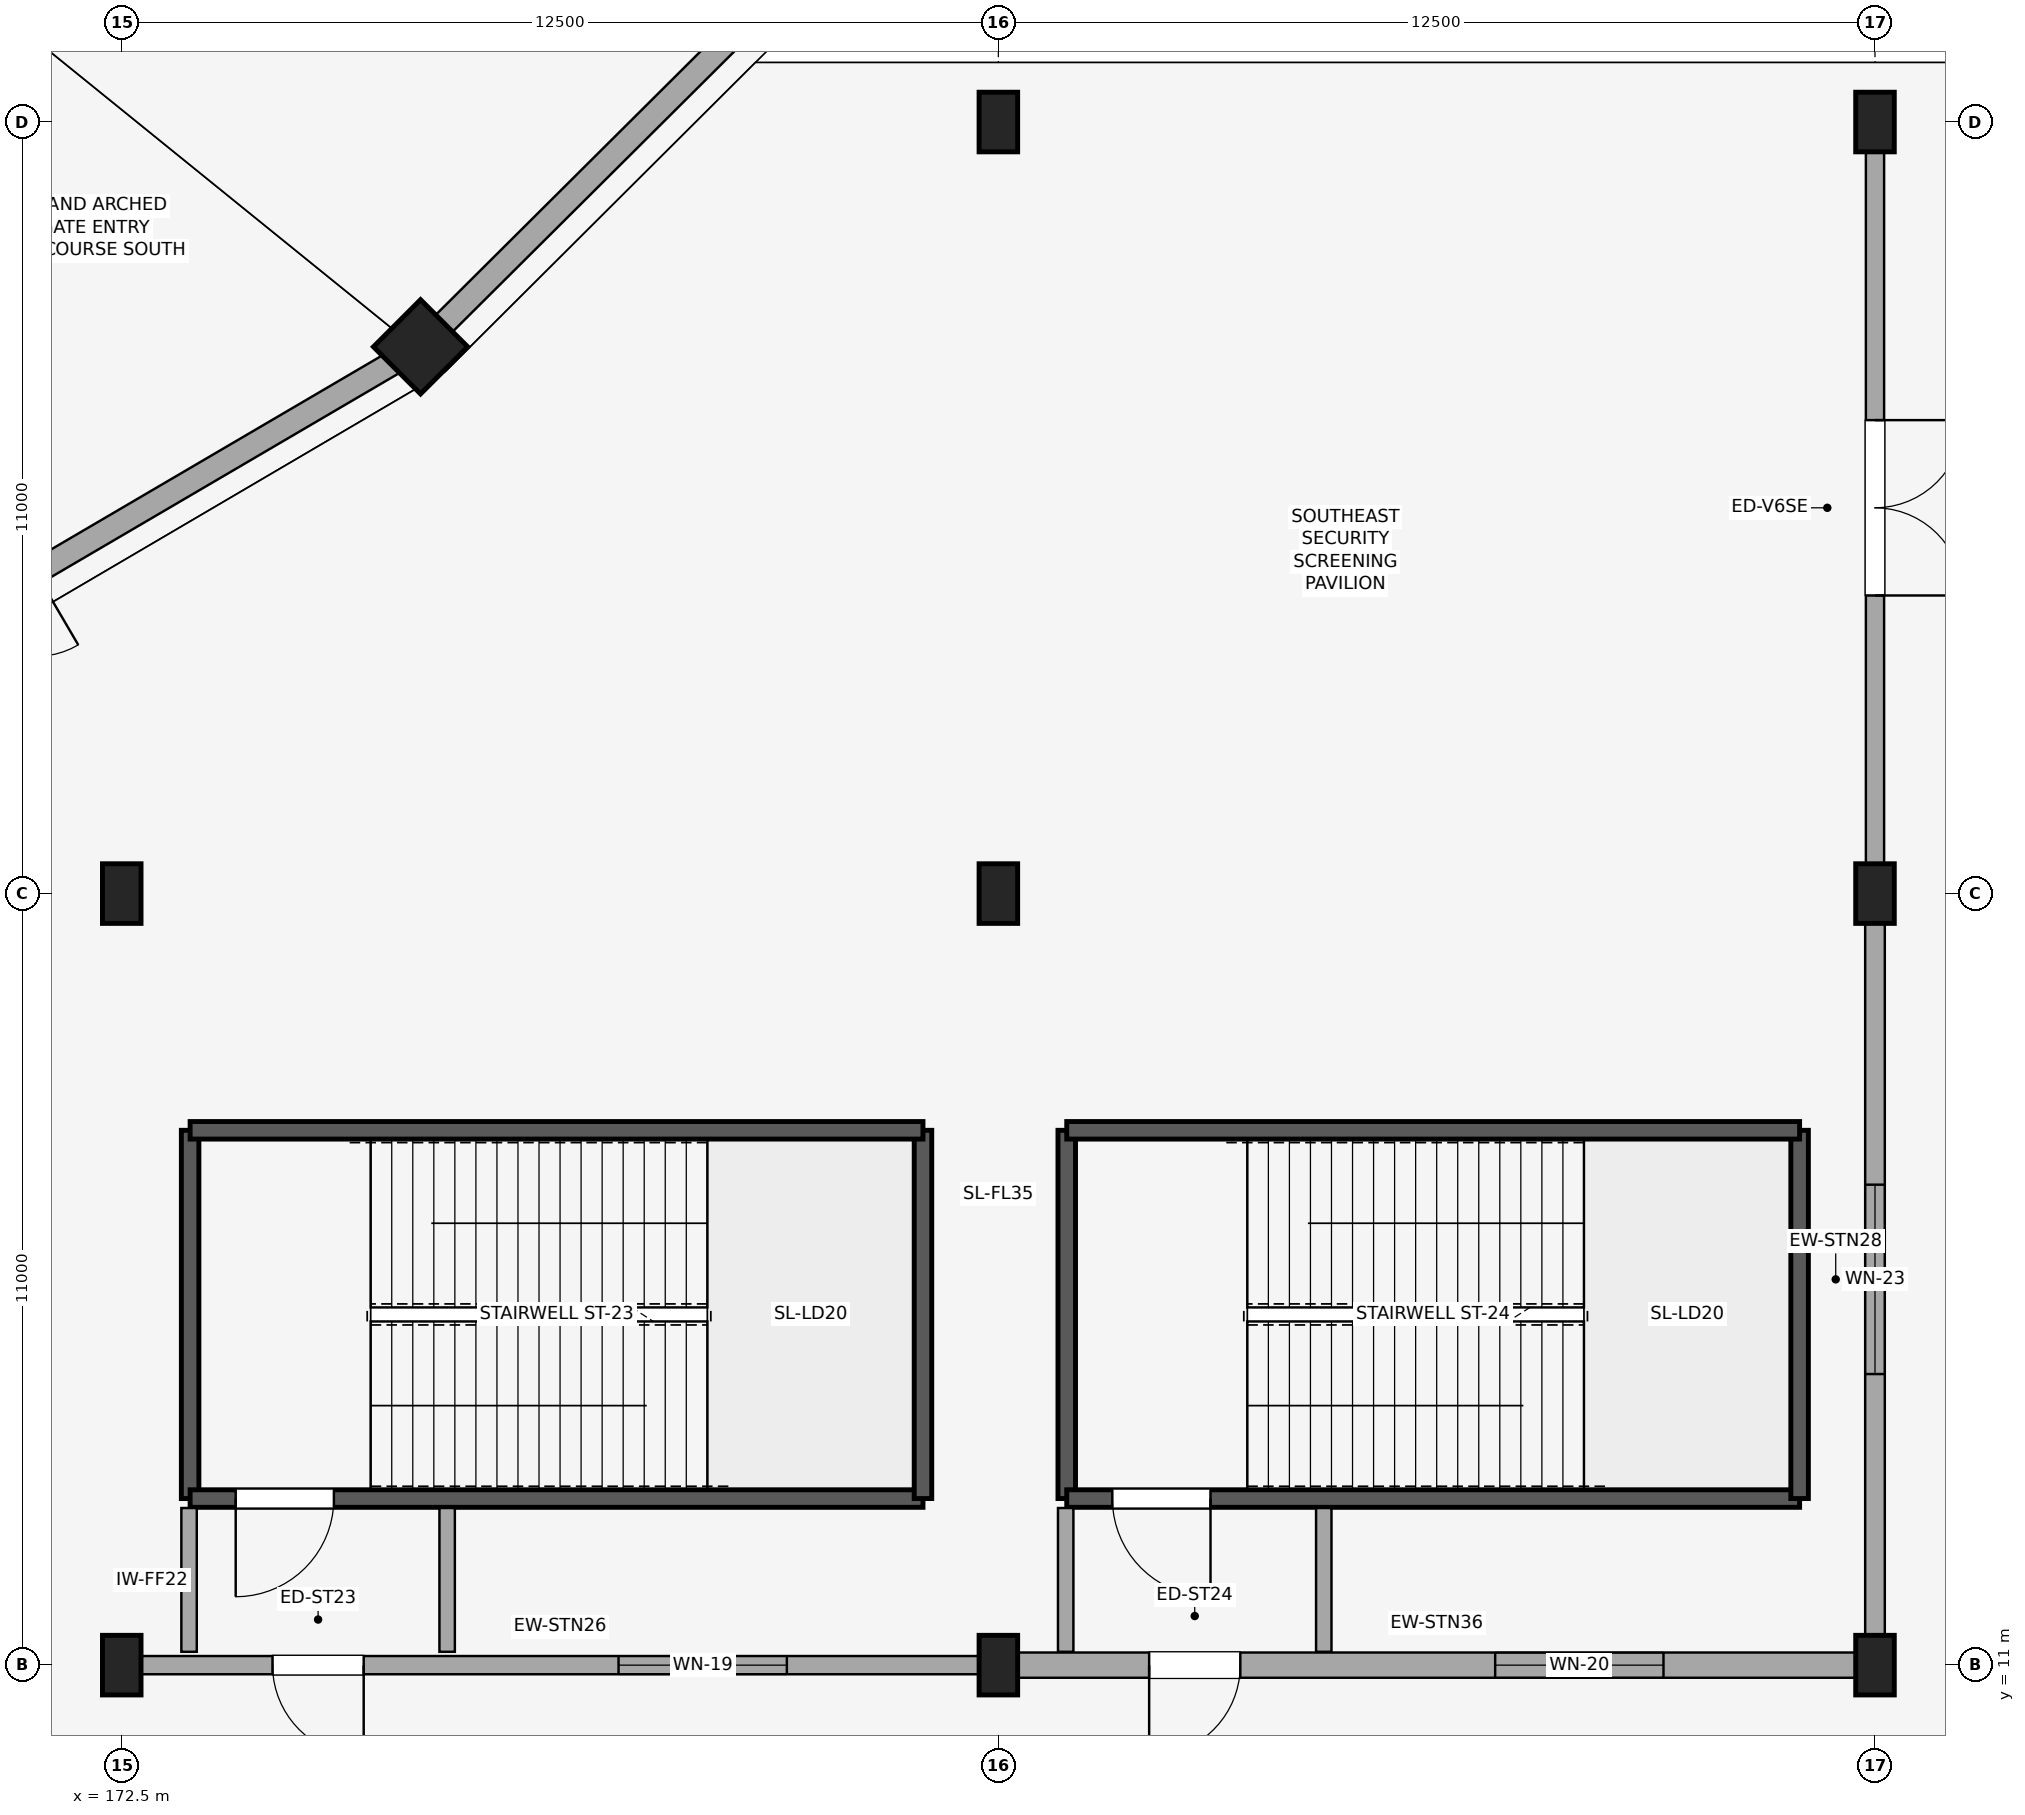
"""IFC4 building model, lengths in metres.
Left out: names, types, materials, properties, quantities, classifications, styles, units other than length and angle.
Written with IfcOpenShell. Run it as: python <this file> out.ifc"""

import sys

from ifc_helpers import new_model, si_unit, direction, frame, frame_2d, origin, origin_2d, place, context, subcontext, project, spatial, rectangle, circle, extrude, element, fill, save


model = new_model("IFC4")
c1 = context("Model", 3, precision=1e-05, world=origin(), true_north=direction((0.0, 1.0)))
c2 = subcontext(c1, "Body", "Model", "MODEL_VIEW")
j1 = project(units=[si_unit("LENGTHUNIT", "METRE"), si_unit("PLANEANGLEUNIT", "RADIAN")], contexts=[c1])
p1 = place(None, origin())
s1 = spatial("IfcSite", under=j1, at=p1, CompositionType="ELEMENT")
p2 = place(p1, origin())
s2 = spatial("IfcBuilding", under=s1, at=p2, CompositionType="ELEMENT")
p3 = place(p2, origin())
s3 = spatial("IfcBuildingStorey", under=s2, at=p3, CompositionType="ELEMENT", Elevation=0.0)
p4 = place(p3, frame((176.761, 29.795, 0.0), z_axis=(0.0, 0.0, 1.0), x_axis=(0.707106781187, -0.707106781187, 0.0)))
e1 = element("IfcColumn", 1, at=p4, inside=s3, PredefinedType="COLUMN", context=c2, shape_type="SweptSolid", body=[
    extrude(circle(Radius=0.475, at=origin_2d()), origin(), (0.0, 0.0, 1.0), 5.4),
])
for number, where, z_axis, x_axis in (
    (2, (172.5, 11.0, 0.0), (0.0, 0.0, 1.0), (1.0, 0.0, 0.0)),
    (3, (172.5, 22.0, 0.0), (0.0, 0.0, 1.0), (1.0, 0.0, 0.0)),
    (4, (185.0, 11.0, 0.0), (0.0, 0.0, 1.0), (1.0, 0.0, 0.0)),
    (5, (185.0, 22.0, 0.0), (0.0, 0.0, 1.0), (1.0, 0.0, 0.0)),
    (6, (185.0, 33.0, 0.0), (0.0, 0.0, 1.0), (1.0, 0.0, 0.0)),
    (7, (197.5, 11.0, 0.0), (0.0, 0.0, 1.0), (1.0, 0.0, 0.0)),
    (8, (197.5, 22.0, 0.0), (0.0, 0.0, 1.0), (1.0, 0.0, 0.0)),
    (9, (197.5, 33.0, 0.0), (0.0, 0.0, 1.0), (1.0, 0.0, 0.0)),
):
    element("IfcColumn", number, at=place(p3, frame(where, z_axis=z_axis, x_axis=x_axis)), inside=s3, PredefinedType="PILASTER", context=c2, shape_type="SweptSolid", body=[
        extrude(rectangle(XDim=0.55, YDim=0.85, at=origin_2d()), origin(), (0.0, 0.0, 1.0), 5.4),
    ])
p5 = place(p3, frame((157.897, 18.745, 0.0), z_axis=(0.0, 0.0, 1.0), x_axis=(0.862843632099, 0.505470935413, 0.0)))
e10 = element("IfcWall", 10, at=p5, inside=s3, PredefinedType="STANDARD", context=c2, shape_type="SweptSolid", body=[
    extrude(rectangle(XDim=21.403, YDim=0.34, at=frame_2d((10.701, 0.0))), origin(), (0.0, 0.0, 1.0), 3.85),
])
p6 = place(p5, frame((5.613, 0.0, 0.0)))
e11 = element("IfcOpeningElement", 11, at=p6, cuts=e10, PredefinedType="OPENING", context=c2, shape_type="SweptSolid", body=[
    extrude(rectangle(XDim=1.3, YDim=2.2, at=frame_2d((0.65, 1.1))), frame((0.0, 0.18, 0.0), z_axis=(0.0, -1.0, 0.0), x_axis=(1.0, 0.0, 0.0)), (0.0, 0.0, 1.0), 0.36),
])
p7 = place(p5, frame((13.103, 0.0, 0.0)))
e12 = element("IfcOpeningElement", 12, at=p7, cuts=e10, PredefinedType="OPENING", context=c2, shape_type="SweptSolid", body=[
    extrude(rectangle(XDim=2.4, YDim=2.4, at=frame_2d((1.2, 1.2))), frame((0.0, 0.18, 0.0), z_axis=(0.0, -1.0, 0.0), x_axis=(1.0, 0.0, 0.0)), (0.0, 0.0, 1.0), 0.36),
])
p8 = place(p3, frame((177.087, 30.12, 0.0), z_axis=(0.0, 0.0, 1.0), x_axis=(0.708905356977, 0.705303618911, 0.0)))
e13 = element("IfcWall", 13, at=p8, inside=s3, PredefinedType="STANDARD", context=c2, shape_type="SweptSolid", body=[
    extrude(rectangle(XDim=19.928, YDim=0.34, at=frame_2d((9.964, 0.0))), origin(), (0.0, 0.0, 1.0), 3.85),
])
p9 = place(p8, frame((8.739, 0.0, 0.0)))
e14 = element("IfcOpeningElement", 14, at=p9, cuts=e13, PredefinedType="OPENING", context=c2, shape_type="SweptSolid", body=[
    extrude(rectangle(XDim=2.45, YDim=2.4, at=frame_2d((1.225, 1.2))), frame((0.0, 0.18, 0.0), z_axis=(0.0, -1.0, 0.0), x_axis=(1.0, 0.0, 0.0)), (0.0, 0.0, 1.0), 0.36),
])
p10 = place(p3, frame((172.772, 11.0, 0.0), z_axis=(0.0, 0.0, 1.0), x_axis=(1.0, 0.0, 0.0)))
e15 = element("IfcWall", 15, at=p10, inside=s3, PredefinedType="STANDARD", context=c2, shape_type="SweptSolid", body=[
    extrude(rectangle(XDim=11.956, YDim=0.26, at=frame_2d((5.978, 0.0))), origin(), (0.0, 0.0, 1.0), 4.48),
])
p11 = place(p10, frame((1.878, 0.0, 0.0)))
e16 = element("IfcOpeningElement", 16, at=p11, cuts=e15, PredefinedType="OPENING", context=c2, shape_type="SweptSolid", body=[
    extrude(rectangle(XDim=1.3, YDim=2.2, at=frame_2d((0.65, 1.1))), frame((0.0, 0.14, 0.0), z_axis=(0.0, -1.0, 0.0), x_axis=(1.0, 0.0, 0.0)), (0.0, 0.0, 1.0), 0.28),
])
p12 = place(p10, frame((6.812, 0.0, 0.95)))
e17 = element("IfcOpeningElement", 17, at=p12, cuts=e15, PredefinedType="OPENING", context=c2, shape_type="SweptSolid", body=[
    extrude(rectangle(XDim=2.4, YDim=1.85, at=frame_2d((1.2, 0.925))), frame((0.0, 0.14, 0.0), z_axis=(0.0, -1.0, 0.0), x_axis=(1.0, 0.0, 0.0)), (0.0, 0.0, 1.0), 0.28),
])
p13 = place(p3, frame((185.272, 11.0, 0.0), z_axis=(0.0, 0.0, 1.0), x_axis=(1.0, 0.0, 0.0)))
e18 = element("IfcWall", 18, at=p13, inside=s3, PredefinedType="STANDARD", context=c2, shape_type="SweptSolid", body=[
    extrude(rectangle(XDim=11.956, YDim=0.36, at=frame_2d((5.978, 0.0))), origin(), (0.0, 0.0, 1.0), 4.48),
])
p14 = place(p13, frame((1.878, 0.0, 0.0)))
e19 = element("IfcOpeningElement", 19, at=p14, cuts=e18, PredefinedType="OPENING", context=c2, shape_type="SweptSolid", body=[
    extrude(rectangle(XDim=1.3, YDim=2.2, at=frame_2d((0.65, 1.1))), frame((0.0, 0.19, 0.0), z_axis=(0.0, -1.0, 0.0), x_axis=(1.0, 0.0, 0.0)), (0.0, 0.0, 1.0), 0.38),
])
p15 = place(p13, frame((6.812, 0.0, 0.95)))
e20 = element("IfcOpeningElement", 20, at=p15, cuts=e18, PredefinedType="OPENING", context=c2, shape_type="SweptSolid", body=[
    extrude(rectangle(XDim=2.4, YDim=2.1, at=frame_2d((1.2, 1.05))), frame((0.0, 0.19, 0.0), z_axis=(0.0, -1.0, 0.0), x_axis=(1.0, 0.0, 0.0)), (0.0, 0.0, 1.0), 0.38),
])
p16 = place(p3, frame((197.5, 11.422, 0.0), z_axis=(0.0, 0.0, 1.0), x_axis=(0.0, 1.0, 0.0)))
e21 = element("IfcWall", 21, at=p16, inside=s3, PredefinedType="STANDARD", context=c2, shape_type="SweptSolid", body=[
    extrude(rectangle(XDim=10.156, YDim=0.28, at=frame_2d((5.078, 0.0))), origin(), (0.0, 0.0, 1.0), 4.48),
])
p17 = place(p16, frame((3.728, 0.0, 0.95)))
e22 = element("IfcOpeningElement", 22, at=p17, cuts=e21, PredefinedType="OPENING", context=c2, shape_type="SweptSolid", body=[
    extrude(rectangle(XDim=2.7, YDim=1.85, at=frame_2d((1.35, 0.925))), frame((0.0, 0.15, 0.0), z_axis=(0.0, -1.0, 0.0), x_axis=(1.0, 0.0, 0.0)), (0.0, 0.0, 1.0), 0.3),
])
p18 = place(p3, frame((197.5, 22.422, 0.0), z_axis=(0.0, 0.0, 1.0), x_axis=(0.0, 1.0, 0.0)))
e23 = element("IfcWall", 23, at=p18, inside=s3, PredefinedType="STANDARD", context=c2, shape_type="SweptSolid", body=[
    extrude(rectangle(XDim=10.156, YDim=0.26, at=frame_2d((5.078, 0.0))), origin(), (0.0, 0.0, 1.0), 4.48),
])
p19 = place(p18, frame((3.828, 0.0, 0.0)))
e24 = element("IfcOpeningElement", 24, at=p19, cuts=e23, PredefinedType="OPENING", context=c2, shape_type="SweptSolid", body=[
    extrude(rectangle(XDim=2.5, YDim=2.5, at=frame_2d((1.25, 1.25))), frame((0.0, 0.14, 0.0), z_axis=(0.0, -1.0, 0.0), x_axis=(1.0, 0.0, 0.0)), (0.0, 0.0, 1.0), 0.28),
])
p20 = place(p3, frame((173.475, 18.625, 0.0), z_axis=(0.0, 0.0, 1.0), x_axis=(0.0, -1.0, 0.0)))
e25 = element("IfcWall", 25, at=p20, inside=s3, PredefinedType="SHEAR", context=c2, shape_type="SweptSolid", body=[
    extrude(rectangle(XDim=5.25, YDim=0.25, at=frame_2d((2.625, 0.0))), origin(), (0.0, 0.0, 1.0), 5.1),
])
p21 = place(p3, frame((173.475, 13.375, 0.0), z_axis=(0.0, 0.0, 1.0), x_axis=(1.0, 0.0, 0.0)))
e26 = element("IfcWall", 26, at=p21, inside=s3, PredefinedType="SHEAR", context=c2, shape_type="SweptSolid", body=[
    extrude(rectangle(XDim=10.45, YDim=0.25, at=frame_2d((5.225, 0.0))), origin(), (0.0, 0.0, 1.0), 5.1),
])
p22 = place(p21, frame((0.65, 0.0, 0.0)))
e27 = element("IfcOpeningElement", 27, at=p22, cuts=e26, PredefinedType="OPENING", context=c2, shape_type="SweptSolid", body=[
    extrude(rectangle(XDim=1.4, YDim=2.2, at=frame_2d((0.7, 1.1))), frame((0.0, 0.135, 0.0), z_axis=(0.0, -1.0, 0.0), x_axis=(1.0, 0.0, 0.0)), (0.0, 0.0, 1.0), 0.27),
])
p23 = place(p3, frame((183.925, 13.375, 0.0), z_axis=(0.0, 0.0, 1.0), x_axis=(0.0, 1.0, 0.0)))
e28 = element("IfcWall", 28, at=p23, inside=s3, PredefinedType="SHEAR", context=c2, shape_type="SweptSolid", body=[
    extrude(rectangle(XDim=5.25, YDim=0.25, at=frame_2d((2.625, 0.0))), origin(), (0.0, 0.0, 1.0), 5.1),
])
p24 = place(p3, frame((183.925, 18.625, 0.0), z_axis=(0.0, 0.0, 1.0), x_axis=(-1.0, 0.0, 0.0)))
e29 = element("IfcWall", 29, at=p24, inside=s3, PredefinedType="SHEAR", context=c2, shape_type="SweptSolid", body=[
    extrude(rectangle(XDim=10.45, YDim=0.25, at=frame_2d((5.225, 0.0))), origin(), (0.0, 0.0, 1.0), 5.1),
])
for number, where, z_axis, x_axis in (
    (30, (173.46, 11.19, 0.0), (0.0, 0.0, 1.0), (0.0, 1.0, 0.0)),
    (31, (177.14, 11.19, 0.0), (0.0, 0.0, 1.0), (0.0, 1.0, 0.0)),
):
    element("IfcWall", number, at=place(p3, frame(where, z_axis=z_axis, x_axis=x_axis)), inside=s3, PredefinedType="PARTITIONING", context=c2, shape_type="SweptSolid", body=[
        extrude(rectangle(XDim=2.05, YDim=0.22, at=frame_2d((1.025, 0.0))), origin(), (0.0, 0.0, 1.0), 3.69),
    ])
p25 = place(p3, frame((185.975, 18.625, 0.0), z_axis=(0.0, 0.0, 1.0), x_axis=(0.0, -1.0, 0.0)))
e32 = element("IfcWall", 32, at=p25, inside=s3, PredefinedType="SHEAR", context=c2, shape_type="SweptSolid", body=[
    extrude(rectangle(XDim=5.25, YDim=0.25, at=frame_2d((2.625, 0.0))), origin(), (0.0, 0.0, 1.0), 5.1),
])
p26 = place(p3, frame((185.975, 13.375, 0.0), z_axis=(0.0, 0.0, 1.0), x_axis=(1.0, 0.0, 0.0)))
e33 = element("IfcWall", 33, at=p26, inside=s3, PredefinedType="SHEAR", context=c2, shape_type="SweptSolid", body=[
    extrude(rectangle(XDim=10.45, YDim=0.25, at=frame_2d((5.225, 0.0))), origin(), (0.0, 0.0, 1.0), 5.1),
])
p27 = place(p26, frame((0.65, 0.0, 0.0)))
e34 = element("IfcOpeningElement", 34, at=p27, cuts=e33, PredefinedType="OPENING", context=c2, shape_type="SweptSolid", body=[
    extrude(rectangle(XDim=1.4, YDim=2.2, at=frame_2d((0.7, 1.1))), frame((0.0, 0.135, 0.0), z_axis=(0.0, -1.0, 0.0), x_axis=(1.0, 0.0, 0.0)), (0.0, 0.0, 1.0), 0.27),
])
p28 = place(p3, frame((196.425, 13.375, 0.0), z_axis=(0.0, 0.0, 1.0), x_axis=(0.0, 1.0, 0.0)))
e35 = element("IfcWall", 35, at=p28, inside=s3, PredefinedType="SHEAR", context=c2, shape_type="SweptSolid", body=[
    extrude(rectangle(XDim=5.25, YDim=0.25, at=frame_2d((2.625, 0.0))), origin(), (0.0, 0.0, 1.0), 5.1),
])
p29 = place(p3, frame((196.425, 18.625, 0.0), z_axis=(0.0, 0.0, 1.0), x_axis=(-1.0, 0.0, 0.0)))
e36 = element("IfcWall", 36, at=p29, inside=s3, PredefinedType="SHEAR", context=c2, shape_type="SweptSolid", body=[
    extrude(rectangle(XDim=10.45, YDim=0.25, at=frame_2d((5.225, 0.0))), origin(), (0.0, 0.0, 1.0), 5.1),
])
for number, where, z_axis, x_axis in (
    (37, (185.96, 11.19, 0.0), (0.0, 0.0, 1.0), (0.0, 1.0, 0.0)),
    (38, (189.64, 11.19, 0.0), (0.0, 0.0, 1.0), (0.0, 1.0, 0.0)),
):
    element("IfcWall", number, at=place(p3, frame(where, z_axis=z_axis, x_axis=x_axis)), inside=s3, PredefinedType="PARTITIONING", context=c2, shape_type="SweptSolid", body=[
        extrude(rectangle(XDim=2.05, YDim=0.22, at=frame_2d((1.025, 0.0))), origin(), (0.0, 0.0, 1.0), 3.69),
    ])
p30 = place(p11, frame((1.3, 0.0, 0.0), z_axis=(0.0, 0.0, 1.0), x_axis=(-1.0, 0.0, 0.0)))
e39 = element("IfcDoor", 39, at=p30, inside=s3, OperationType="SINGLE_SWING_LEFT", PredefinedType="DOOR", context=c2, shape_type="SweptSolid", body=[
    extrude(rectangle(XDim=1.3, YDim=2.2, at=frame_2d((0.65, 1.1))), frame((0.0, 0.025, 0.0), z_axis=(0.0, -1.0, 0.0), x_axis=(1.0, 0.0, 0.0)), (0.0, 0.0, 1.0), 0.05),
])
fill(e16, e39)
p31 = place(p12, origin())
e40 = element("IfcWindow", 40, at=p31, inside=s3, PartitioningType="SINGLE_PANEL", PredefinedType="WINDOW", context=c2, shape_type="SweptSolid", body=[
    extrude(rectangle(XDim=2.4, YDim=1.85, at=frame_2d((1.2, 0.925))), frame((0.0, 0.03, 0.0), z_axis=(0.0, -1.0, 0.0), x_axis=(1.0, 0.0, 0.0)), (0.0, 0.0, 1.0), 0.06),
])
fill(e17, e40)
p32 = place(p14, frame((1.3, 0.0, 0.0), z_axis=(0.0, 0.0, 1.0), x_axis=(-1.0, 0.0, 0.0)))
e41 = element("IfcDoor", 41, at=p32, inside=s3, OperationType="SINGLE_SWING_RIGHT", PredefinedType="DOOR", context=c2, shape_type="SweptSolid", body=[
    extrude(rectangle(XDim=1.3, YDim=2.2, at=frame_2d((0.65, 1.1))), frame((0.0, 0.025, 0.0), z_axis=(0.0, -1.0, 0.0), x_axis=(1.0, 0.0, 0.0)), (0.0, 0.0, 1.0), 0.05),
])
fill(e19, e41)
p33 = place(p15, origin())
e42 = element("IfcWindow", 42, at=p33, inside=s3, PartitioningType="SINGLE_PANEL", PredefinedType="WINDOW", context=c2, shape_type="SweptSolid", body=[
    extrude(rectangle(XDim=2.4, YDim=2.1, at=frame_2d((1.2, 1.05))), frame((0.0, 0.03, 0.0), z_axis=(0.0, -1.0, 0.0), x_axis=(1.0, 0.0, 0.0)), (0.0, 0.0, 1.0), 0.06),
])
fill(e20, e42)
p34 = place(p17, origin())
e43 = element("IfcWindow", 43, at=p34, inside=s3, PartitioningType="SINGLE_PANEL", PredefinedType="WINDOW", context=c2, shape_type="SweptSolid", body=[
    extrude(rectangle(XDim=2.7, YDim=1.85, at=frame_2d((1.35, 0.925))), frame((0.0, 0.03, 0.0), z_axis=(0.0, -1.0, 0.0), x_axis=(1.0, 0.0, 0.0)), (0.0, 0.0, 1.0), 0.06),
])
fill(e22, e43)
p35 = place(p19, frame((2.5, 0.0, 0.0), z_axis=(0.0, 0.0, 1.0), x_axis=(-1.0, 0.0, 0.0)))
e44 = element("IfcDoor", 44, at=p35, inside=s3, OperationType="DOUBLE_DOOR_SINGLE_SWING", PredefinedType="DOOR", context=c2, shape_type="SweptSolid", body=[
    extrude(rectangle(XDim=2.5, YDim=2.5, at=frame_2d((1.25, 1.25))), frame((0.0, 0.025, 0.0), z_axis=(0.0, -1.0, 0.0), x_axis=(1.0, 0.0, 0.0)), (0.0, 0.0, 1.0), 0.05),
])
fill(e24, e44)
p36 = place(p22, frame((1.4, 0.0, 0.0), z_axis=(0.0, 0.0, 1.0), x_axis=(-1.0, 0.0, 0.0)))
e45 = element("IfcDoor", 45, at=p36, inside=s3, OperationType="SINGLE_SWING_RIGHT", PredefinedType="DOOR", context=c2, shape_type="SweptSolid", body=[
    extrude(rectangle(XDim=1.4, YDim=2.2, at=frame_2d((0.7, 1.1))), frame((0.0, 0.025, 0.0), z_axis=(0.0, -1.0, 0.0), x_axis=(1.0, 0.0, 0.0)), (0.0, 0.0, 1.0), 0.05),
])
fill(e27, e45)
p37 = place(p27, frame((1.4, 0.0, 0.0), z_axis=(0.0, 0.0, 1.0), x_axis=(-1.0, 0.0, 0.0)))
e46 = element("IfcDoor", 46, at=p37, inside=s3, OperationType="SINGLE_SWING_LEFT", PredefinedType="DOOR", context=c2, shape_type="SweptSolid", body=[
    extrude(rectangle(XDim=1.4, YDim=2.2, at=frame_2d((0.7, 1.1))), frame((0.0, 0.025, 0.0), z_axis=(0.0, -1.0, 0.0), x_axis=(1.0, 0.0, 0.0)), (0.0, 0.0, 1.0), 0.05),
])
fill(e34, e46)
save(model, sys.argv[1])
